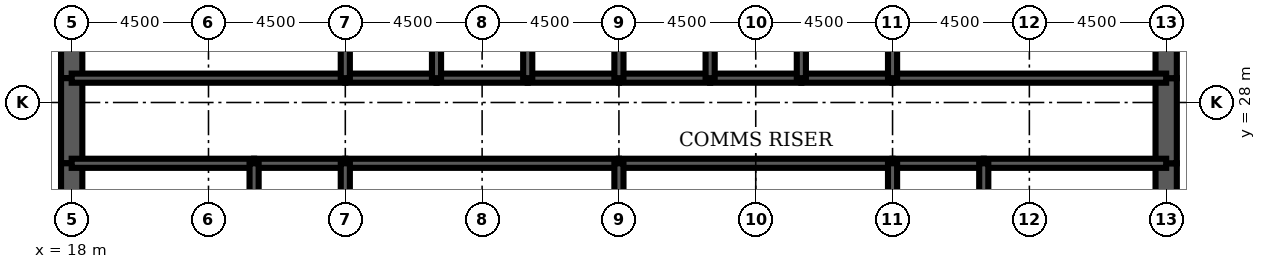
"""IFC4 building model, lengths in metres.
Left out: names, types, materials, properties, quantities, classifications, styles, units other than length and angle.
Written with IfcOpenShell. Run it as: python <this file> out.ifc"""

import sys

from ifc_helpers import new_model, si_unit, direction, frame, frame_2d, origin, place, context, subcontext, project, spatial, rectangle, extrude, element, fill, save


model = new_model("IFC4")
c1 = context("Model", 3, precision=1e-05, world=origin(), true_north=direction((0.0, 1.0)))
c2 = subcontext(c1, "Body", "Model", "MODEL_VIEW")
j1 = project(units=[si_unit("LENGTHUNIT", "METRE"), si_unit("PLANEANGLEUNIT", "RADIAN")], contexts=[c1])
p1 = place(None, origin())
s1 = spatial("IfcSite", under=j1, at=p1, CompositionType="ELEMENT")
p2 = place(p1, origin())
s2 = spatial("IfcBuilding", under=s1, at=p2, CompositionType="ELEMENT")
p3 = place(p2, frame((0.0, 0.0, 300.5)))
s3 = spatial("IfcBuildingStorey", under=s2, at=p3, CompositionType="ELEMENT", Elevation=300.5)
p4 = place(p3, frame((18.0, 32.0, 0.0), z_axis=(0.0, 0.0, 1.0), x_axis=(0.0, -1.0, 0.0)))
e1 = element("IfcWall", 1, at=p4, inside=s3, PredefinedType="SHEAR", context=c2, shape_type="SweptSolid", body=[
    extrude(rectangle(XDim=3.2, YDim=0.7, at=frame_2d((1.6, 0.0))), origin(), (0.0, 0.0, 1.0), 4.2),
])
p5 = place(p3, frame((18.0, 28.8, 0.0), z_axis=(0.0, 0.0, 1.0), x_axis=(0.0, -1.0, 0.0)))
e2 = element("IfcWall", 2, at=p5, inside=s3, PredefinedType="SHEAR", context=c2, shape_type="SweptSolid", body=[
    extrude(rectangle(XDim=2.8, YDim=0.7, at=frame_2d((1.4, 0.0))), origin(), (0.0, 0.0, 1.0), 4.2),
])
p6 = place(p5, frame((0.4, 0.0, 0.0)))
e3 = element("IfcOpeningElement", 3, at=p6, cuts=e2, PredefinedType="OPENING", context=c2, shape_type="SweptSolid", body=[
    extrude(rectangle(XDim=1.8, YDim=2.1, at=frame_2d((0.9, 1.05))), frame((0.0, 0.36, 0.0), z_axis=(0.0, -1.0, 0.0), x_axis=(1.0, 0.0, 0.0)), (0.0, 0.0, 1.0), 0.72),
])
for number, where, z_axis, x_axis in (
    (4, (18.0, 26.0, 0.0), (0.0, 0.0, 1.0), (0.0, -1.0, 0.0)),
    (5, (54.0, 22.0, 0.0), (0.0, 0.0, 1.0), (0.0, 1.0, 0.0)),
):
    element("IfcWall", number, at=place(p3, frame(where, z_axis=z_axis, x_axis=x_axis)), inside=s3, PredefinedType="SHEAR", context=c2, shape_type="SweptSolid", body=[
        extrude(rectangle(XDim=4.0, YDim=0.7, at=frame_2d((2.0, 0.0))), origin(), (0.0, 0.0, 1.0), 4.2),
    ])
p7 = place(p3, frame((54.0, 26.0, 0.0), z_axis=(0.0, 0.0, 1.0), x_axis=(0.0, 1.0, 0.0)))
e6 = element("IfcWall", 6, at=p7, inside=s3, PredefinedType="SHEAR", context=c2, shape_type="SweptSolid", body=[
    extrude(rectangle(XDim=2.8, YDim=0.7, at=frame_2d((1.4, 0.0))), origin(), (0.0, 0.0, 1.0), 4.2),
])
p8 = place(p7, frame((0.6, 0.0, 0.0)))
e7 = element("IfcOpeningElement", 7, at=p8, cuts=e6, PredefinedType="OPENING", context=c2, shape_type="SweptSolid", body=[
    extrude(rectangle(XDim=1.8, YDim=2.1, at=frame_2d((0.9, 1.05))), frame((0.0, 0.36, 0.0), z_axis=(0.0, -1.0, 0.0), x_axis=(1.0, 0.0, 0.0)), (0.0, 0.0, 1.0), 0.72),
])
p9 = place(p3, frame((54.0, 28.8, 0.0), z_axis=(0.0, 0.0, 1.0), x_axis=(0.0, 1.0, 0.0)))
e8 = element("IfcWall", 8, at=p9, inside=s3, PredefinedType="SHEAR", context=c2, shape_type="SweptSolid", body=[
    extrude(rectangle(XDim=3.2, YDim=0.7, at=frame_2d((1.6, 0.0))), origin(), (0.0, 0.0, 1.0), 4.2),
])
p10 = place(p3, frame((18.0, 28.8, 0.0), z_axis=(0.0, 0.0, 1.0), x_axis=(1.0, 0.0, 0.0)))
e9 = element("IfcWall", 9, at=p10, inside=s3, PredefinedType="SOLIDWALL", context=c2, shape_type="SweptSolid", body=[
    extrude(rectangle(XDim=9.0, YDim=0.3, at=frame_2d((4.5, 0.0))), origin(), (0.0, 0.0, 1.0), 4.2),
])
p11 = place(p10, frame((0.65, 0.0, 0.0)))
e10 = element("IfcOpeningElement", 10, at=p11, cuts=e9, PredefinedType="OPENING", context=c2, shape_type="SweptSolid", body=[
    extrude(rectangle(XDim=1.0, YDim=2.1, at=frame_2d((0.5, 1.05))), frame((0.0, 0.16, 0.0), z_axis=(0.0, -1.0, 0.0), x_axis=(1.0, 0.0, 0.0)), (0.0, 0.0, 1.0), 0.32),
])
p12 = place(p3, frame((27.0, 28.8, 0.0), z_axis=(0.0, 0.0, 1.0), x_axis=(1.0, 0.0, 0.0)))
e11 = element("IfcWall", 11, at=p12, inside=s3, PredefinedType="SOLIDWALL", context=c2, shape_type="SweptSolid", body=[
    extrude(rectangle(XDim=3.0, YDim=0.3, at=frame_2d((1.5, 0.0))), origin(), (0.0, 0.0, 1.0), 4.2),
])
p13 = place(p12, frame((0.95, 0.0, 0.0)))
e12 = element("IfcOpeningElement", 12, at=p13, cuts=e11, PredefinedType="OPENING", context=c2, shape_type="SweptSolid", body=[
    extrude(rectangle(XDim=1.1, YDim=2.2, at=frame_2d((0.55, 1.1))), frame((0.0, 0.16, 0.0), z_axis=(0.0, -1.0, 0.0), x_axis=(1.0, 0.0, 0.0)), (0.0, 0.0, 1.0), 0.32),
])
p14 = place(p3, frame((30.0, 28.8, 0.0), z_axis=(0.0, 0.0, 1.0), x_axis=(1.0, 0.0, 0.0)))
e13 = element("IfcWall", 13, at=p14, inside=s3, PredefinedType="SOLIDWALL", context=c2, shape_type="SweptSolid", body=[
    extrude(rectangle(XDim=3.0, YDim=0.3, at=frame_2d((1.5, 0.0))), origin(), (0.0, 0.0, 1.0), 4.2),
])
p15 = place(p14, frame((0.95, 0.0, 0.0)))
e14 = element("IfcOpeningElement", 14, at=p15, cuts=e13, PredefinedType="OPENING", context=c2, shape_type="SweptSolid", body=[
    extrude(rectangle(XDim=1.1, YDim=2.2, at=frame_2d((0.55, 1.1))), frame((0.0, 0.16, 0.0), z_axis=(0.0, -1.0, 0.0), x_axis=(1.0, 0.0, 0.0)), (0.0, 0.0, 1.0), 0.32),
])
p16 = place(p3, frame((33.0, 28.8, 0.0), z_axis=(0.0, 0.0, 1.0), x_axis=(1.0, 0.0, 0.0)))
e15 = element("IfcWall", 15, at=p16, inside=s3, PredefinedType="SOLIDWALL", context=c2, shape_type="SweptSolid", body=[
    extrude(rectangle(XDim=3.0, YDim=0.3, at=frame_2d((1.5, 0.0))), origin(), (0.0, 0.0, 1.0), 4.2),
])
p17 = place(p16, frame((0.95, 0.0, 0.0)))
e16 = element("IfcOpeningElement", 16, at=p17, cuts=e15, PredefinedType="OPENING", context=c2, shape_type="SweptSolid", body=[
    extrude(rectangle(XDim=1.1, YDim=2.2, at=frame_2d((0.55, 1.1))), frame((0.0, 0.16, 0.0), z_axis=(0.0, -1.0, 0.0), x_axis=(1.0, 0.0, 0.0)), (0.0, 0.0, 1.0), 0.32),
])
p18 = place(p3, frame((36.0, 28.8, 0.0), z_axis=(0.0, 0.0, 1.0), x_axis=(1.0, 0.0, 0.0)))
e17 = element("IfcWall", 17, at=p18, inside=s3, PredefinedType="SOLIDWALL", context=c2, shape_type="SweptSolid", body=[
    extrude(rectangle(XDim=3.0, YDim=0.3, at=frame_2d((1.5, 0.0))), origin(), (0.0, 0.0, 1.0), 4.2),
])
p19 = place(p18, frame((1.0, 0.0, 0.0)))
e18 = element("IfcOpeningElement", 18, at=p19, cuts=e17, PredefinedType="OPENING", context=c2, shape_type="SweptSolid", body=[
    extrude(rectangle(XDim=1.0, YDim=2.1, at=frame_2d((0.5, 1.05))), frame((0.0, 0.16, 0.0), z_axis=(0.0, -1.0, 0.0), x_axis=(1.0, 0.0, 0.0)), (0.0, 0.0, 1.0), 0.32),
])
p20 = place(p3, frame((39.0, 28.8, 0.0), z_axis=(0.0, 0.0, 1.0), x_axis=(1.0, 0.0, 0.0)))
e19 = element("IfcWall", 19, at=p20, inside=s3, PredefinedType="SOLIDWALL", context=c2, shape_type="SweptSolid", body=[
    extrude(rectangle(XDim=3.0, YDim=0.3, at=frame_2d((1.5, 0.0))), origin(), (0.0, 0.0, 1.0), 4.2),
])
p21 = place(p20, frame((1.0, 0.0, 0.0)))
e20 = element("IfcOpeningElement", 20, at=p21, cuts=e19, PredefinedType="OPENING", context=c2, shape_type="SweptSolid", body=[
    extrude(rectangle(XDim=1.0, YDim=2.1, at=frame_2d((0.5, 1.05))), frame((0.0, 0.16, 0.0), z_axis=(0.0, -1.0, 0.0), x_axis=(1.0, 0.0, 0.0)), (0.0, 0.0, 1.0), 0.32),
])
p22 = place(p3, frame((42.0, 28.8, 0.0), z_axis=(0.0, 0.0, 1.0), x_axis=(1.0, 0.0, 0.0)))
e21 = element("IfcWall", 21, at=p22, inside=s3, PredefinedType="SOLIDWALL", context=c2, shape_type="SweptSolid", body=[
    extrude(rectangle(XDim=3.0, YDim=0.3, at=frame_2d((1.5, 0.0))), origin(), (0.0, 0.0, 1.0), 4.2),
])
p23 = place(p22, frame((0.95, 0.0, 0.0)))
e22 = element("IfcOpeningElement", 22, at=p23, cuts=e21, PredefinedType="OPENING", context=c2, shape_type="SweptSolid", body=[
    extrude(rectangle(XDim=1.1, YDim=2.2, at=frame_2d((0.55, 1.1))), frame((0.0, 0.16, 0.0), z_axis=(0.0, -1.0, 0.0), x_axis=(1.0, 0.0, 0.0)), (0.0, 0.0, 1.0), 0.32),
])
p24 = place(p3, frame((45.0, 28.8, 0.0), z_axis=(0.0, 0.0, 1.0), x_axis=(1.0, 0.0, 0.0)))
e23 = element("IfcWall", 23, at=p24, inside=s3, PredefinedType="SOLIDWALL", context=c2, shape_type="SweptSolid", body=[
    extrude(rectangle(XDim=9.0, YDim=0.3, at=frame_2d((4.5, 0.0))), origin(), (0.0, 0.0, 1.0), 4.2),
])
p25 = place(p24, frame((7.35, 0.0, 0.0)))
e24 = element("IfcOpeningElement", 24, at=p25, cuts=e23, PredefinedType="OPENING", context=c2, shape_type="SweptSolid", body=[
    extrude(rectangle(XDim=1.0, YDim=2.1, at=frame_2d((0.5, 1.05))), frame((0.0, 0.16, 0.0), z_axis=(0.0, -1.0, 0.0), x_axis=(1.0, 0.0, 0.0)), (0.0, 0.0, 1.0), 0.32),
])
p26 = place(p3, frame((18.0, 26.0, 0.0), z_axis=(0.0, 0.0, 1.0), x_axis=(1.0, 0.0, 0.0)))
e25 = element("IfcWall", 25, at=p26, inside=s3, PredefinedType="SOLIDWALL", context=c2, shape_type="SweptSolid", body=[
    extrude(rectangle(XDim=6.0, YDim=0.3, at=frame_2d((3.0, 0.0))), origin(), (0.0, 0.0, 1.0), 4.2),
])
p27 = place(p3, frame((24.0, 26.0, 0.0), z_axis=(0.0, 0.0, 1.0), x_axis=(1.0, 0.0, 0.0)))
e26 = element("IfcWall", 26, at=p27, inside=s3, PredefinedType="SOLIDWALL", context=c2, shape_type="SweptSolid", body=[
    extrude(rectangle(XDim=3.0, YDim=0.3, at=frame_2d((1.5, 0.0))), origin(), (0.0, 0.0, 1.0), 4.2),
])
for number, where, z_axis, x_axis in (
    (27, (27.0, 26.0, 0.0), (0.0, 0.0, 1.0), (1.0, 0.0, 0.0)),
    (28, (36.0, 26.0, 0.0), (0.0, 0.0, 1.0), (1.0, 0.0, 0.0)),
):
    element("IfcWall", number, at=place(p3, frame(where, z_axis=z_axis, x_axis=x_axis)), inside=s3, PredefinedType="SOLIDWALL", context=c2, shape_type="SweptSolid", body=[
        extrude(rectangle(XDim=9.0, YDim=0.3, at=frame_2d((4.5, 0.0))), origin(), (0.0, 0.0, 1.0), 4.2),
    ])
p28 = place(p3, frame((45.0, 26.0, 0.0), z_axis=(0.0, 0.0, 1.0), x_axis=(1.0, 0.0, 0.0)))
e29 = element("IfcWall", 29, at=p28, inside=s3, PredefinedType="SOLIDWALL", context=c2, shape_type="SweptSolid", body=[
    extrude(rectangle(XDim=3.0, YDim=0.3, at=frame_2d((1.5, 0.0))), origin(), (0.0, 0.0, 1.0), 4.2),
])
p29 = place(p3, frame((48.0, 26.0, 0.0), z_axis=(0.0, 0.0, 1.0), x_axis=(1.0, 0.0, 0.0)))
e30 = element("IfcWall", 30, at=p29, inside=s3, PredefinedType="SOLIDWALL", context=c2, shape_type="SweptSolid", body=[
    extrude(rectangle(XDim=6.0, YDim=0.3, at=frame_2d((3.0, 0.0))), origin(), (0.0, 0.0, 1.0), 4.2),
])
for number, where, z_axis, x_axis in (
    (31, (27.0, 28.8, 0.0), (0.0, 0.0, 1.0), (0.0, 1.0, 0.0)),
    (32, (30.0, 28.8, 0.0), (0.0, 0.0, 1.0), (0.0, 1.0, 0.0)),
    (33, (33.0, 28.8, 0.0), (0.0, 0.0, 1.0), (0.0, 1.0, 0.0)),
    (34, (36.0, 28.8, 0.0), (0.0, 0.0, 1.0), (0.0, 1.0, 0.0)),
    (35, (39.0, 28.8, 0.0), (0.0, 0.0, 1.0), (0.0, 1.0, 0.0)),
    (36, (42.0, 28.8, 0.0), (0.0, 0.0, 1.0), (0.0, 1.0, 0.0)),
    (37, (45.0, 28.8, 0.0), (0.0, 0.0, 1.0), (0.0, 1.0, 0.0)),
):
    element("IfcWall", number, at=place(p3, frame(where, z_axis=z_axis, x_axis=x_axis)), inside=s3, PredefinedType="SOLIDWALL", context=c2, shape_type="SweptSolid", body=[
        extrude(rectangle(XDim=3.2, YDim=0.3, at=frame_2d((1.6, 0.0))), origin(), (0.0, 0.0, 1.0), 4.2),
    ])
for number, where, z_axis, x_axis in (
    (38, (24.0, 22.0, 0.0), (0.0, 0.0, 1.0), (0.0, 1.0, 0.0)),
    (39, (27.0, 22.0, 0.0), (0.0, 0.0, 1.0), (0.0, 1.0, 0.0)),
    (40, (36.0, 22.0, 0.0), (0.0, 0.0, 1.0), (0.0, 1.0, 0.0)),
    (41, (45.0, 22.0, 0.0), (0.0, 0.0, 1.0), (0.0, 1.0, 0.0)),
    (42, (48.0, 22.0, 0.0), (0.0, 0.0, 1.0), (0.0, 1.0, 0.0)),
):
    element("IfcWall", number, at=place(p3, frame(where, z_axis=z_axis, x_axis=x_axis)), inside=s3, PredefinedType="SOLIDWALL", context=c2, shape_type="SweptSolid", body=[
        extrude(rectangle(XDim=4.0, YDim=0.3, at=frame_2d((2.0, 0.0))), origin(), (0.0, 0.0, 1.0), 4.2),
    ])
p30 = place(p3, frame((42.0, 22.15, 0.0), z_axis=(0.0, 0.0, 1.0), x_axis=(0.0, 1.0, 0.0)))
e43 = element("IfcWall", 43, at=p30, inside=s3, PredefinedType="PARTITIONING", context=c2, shape_type="SweptSolid", body=[
    extrude(rectangle(XDim=3.7, YDim=0.15, at=frame_2d((1.85, 0.0))), origin(), (0.0, 0.0, 1.0), 3.0),
])
p31 = place(p30, frame((2.2, 0.0, 0.0)))
e44 = element("IfcOpeningElement", 44, at=p31, cuts=e43, PredefinedType="OPENING", context=c2, shape_type="SweptSolid", body=[
    extrude(rectangle(XDim=1.0, YDim=2.1, at=frame_2d((0.5, 1.05))), frame((0.0, 0.085, 0.0), z_axis=(0.0, -1.0, 0.0), x_axis=(1.0, 0.0, 0.0)), (0.0, 0.0, 1.0), 0.17),
])
for number, where, z_axis, x_axis in (
    (45, (20.225, 22.15, 0.0), (0.0, 0.0, 1.0), (0.0, 1.0, 0.0)),
    (46, (51.475, 22.15, 0.0), (0.0, 0.0, 1.0), (0.0, 1.0, 0.0)),
):
    element("IfcWall", number, at=place(p3, frame(where, z_axis=z_axis, x_axis=x_axis)), inside=s3, PredefinedType="PARTITIONING", context=c2, shape_type="SweptSolid", body=[
        extrude(rectangle(XDim=3.7, YDim=0.15, at=frame_2d((1.85, 0.0))), origin(), (0.0, 0.0, 1.0), 3.0),
    ])
p32 = place(p31, origin())
e47 = element("IfcDoor", 47, at=p32, inside=s3, OperationType="SINGLE_SWING_RIGHT", PredefinedType="DOOR", context=c2, shape_type="SweptSolid", body=[
    extrude(rectangle(XDim=1.0, YDim=2.1, at=frame_2d((0.5, 1.05))), frame((0.0, 0.025, 0.0), z_axis=(0.0, -1.0, 0.0), x_axis=(1.0, 0.0, 0.0)), (0.0, 0.0, 1.0), 0.05),
])
fill(e44, e47)
p33 = place(p23, origin())
e48 = element("IfcDoor", 48, at=p33, inside=s3, OperationType="DOUBLE_DOOR_SLIDING", PredefinedType="USERDEFINED", context=c2, shape_type="SweptSolid", body=[
    extrude(rectangle(XDim=1.1, YDim=2.2, at=frame_2d((0.55, 1.1))), frame((0.0, 0.025, 0.0), z_axis=(0.0, -1.0, 0.0), x_axis=(1.0, 0.0, 0.0)), (0.0, 0.0, 1.0), 0.05),
])
fill(e22, e48)
p34 = place(p13, origin())
e49 = element("IfcDoor", 49, at=p34, inside=s3, OperationType="DOUBLE_DOOR_SLIDING", PredefinedType="USERDEFINED", context=c2, shape_type="SweptSolid", body=[
    extrude(rectangle(XDim=1.1, YDim=2.2, at=frame_2d((0.55, 1.1))), frame((0.0, 0.025, 0.0), z_axis=(0.0, -1.0, 0.0), x_axis=(1.0, 0.0, 0.0)), (0.0, 0.0, 1.0), 0.05),
])
fill(e12, e49)
p35 = place(p15, origin())
e50 = element("IfcDoor", 50, at=p35, inside=s3, OperationType="DOUBLE_DOOR_SLIDING", PredefinedType="USERDEFINED", context=c2, shape_type="SweptSolid", body=[
    extrude(rectangle(XDim=1.1, YDim=2.2, at=frame_2d((0.55, 1.1))), frame((0.0, 0.025, 0.0), z_axis=(0.0, -1.0, 0.0), x_axis=(1.0, 0.0, 0.0)), (0.0, 0.0, 1.0), 0.05),
])
fill(e14, e50)
p36 = place(p17, origin())
e51 = element("IfcDoor", 51, at=p36, inside=s3, OperationType="DOUBLE_DOOR_SLIDING", PredefinedType="USERDEFINED", context=c2, shape_type="SweptSolid", body=[
    extrude(rectangle(XDim=1.1, YDim=2.2, at=frame_2d((0.55, 1.1))), frame((0.0, 0.025, 0.0), z_axis=(0.0, -1.0, 0.0), x_axis=(1.0, 0.0, 0.0)), (0.0, 0.0, 1.0), 0.05),
])
fill(e16, e51)
p37 = place(p11, origin())
e52 = element("IfcDoor", 52, at=p37, inside=s3, OperationType="SINGLE_SWING_LEFT", PredefinedType="DOOR", context=c2, shape_type="SweptSolid", body=[
    extrude(rectangle(XDim=1.0, YDim=2.1, at=frame_2d((0.5, 1.05))), frame((0.0, 0.025, 0.0), z_axis=(0.0, -1.0, 0.0), x_axis=(1.0, 0.0, 0.0)), (0.0, 0.0, 1.0), 0.05),
])
fill(e10, e52)
p38 = place(p25, origin())
e53 = element("IfcDoor", 53, at=p38, inside=s3, OperationType="SINGLE_SWING_RIGHT", PredefinedType="DOOR", context=c2, shape_type="SweptSolid", body=[
    extrude(rectangle(XDim=1.0, YDim=2.1, at=frame_2d((0.5, 1.05))), frame((0.0, 0.025, 0.0), z_axis=(0.0, -1.0, 0.0), x_axis=(1.0, 0.0, 0.0)), (0.0, 0.0, 1.0), 0.05),
])
fill(e24, e53)
p39 = place(p6, origin())
e54 = element("IfcDoor", 54, at=p39, inside=s3, OperationType="SINGLE_SWING_LEFT", PredefinedType="DOOR", context=c2, shape_type="SweptSolid", body=[
    extrude(rectangle(XDim=1.8, YDim=2.1, at=frame_2d((0.9, 1.05))), frame((0.0, 0.35, 0.0), z_axis=(0.0, -1.0, 0.0), x_axis=(1.0, 0.0, 0.0)), (0.0, 0.0, 1.0), 0.699),
])
fill(e3, e54)
p40 = place(p8, origin())
e55 = element("IfcDoor", 55, at=p40, inside=s3, OperationType="SINGLE_SWING_LEFT", PredefinedType="DOOR", context=c2, shape_type="SweptSolid", body=[
    extrude(rectangle(XDim=1.8, YDim=2.1, at=frame_2d((0.9, 1.05))), frame((0.0, 0.35, 0.0), z_axis=(0.0, -1.0, 0.0), x_axis=(1.0, 0.0, 0.0)), (0.0, 0.0, 1.0), 0.699),
])
fill(e7, e55)
p41 = place(p19, origin())
e56 = element("IfcDoor", 56, at=p41, inside=s3, OperationType="SINGLE_SWING_LEFT", PredefinedType="DOOR", context=c2, shape_type="SweptSolid", body=[
    extrude(rectangle(XDim=1.0, YDim=2.1, at=frame_2d((0.5, 1.05))), frame((0.0, 0.025, 0.0), z_axis=(0.0, -1.0, 0.0), x_axis=(1.0, 0.0, 0.0)), (0.0, 0.0, 1.0), 0.05),
])
fill(e18, e56)
p42 = place(p21, origin())
e57 = element("IfcDoor", 57, at=p42, inside=s3, OperationType="SINGLE_SWING_LEFT", PredefinedType="DOOR", context=c2, shape_type="SweptSolid", body=[
    extrude(rectangle(XDim=1.0, YDim=2.1, at=frame_2d((0.5, 1.05))), frame((0.0, 0.025, 0.0), z_axis=(0.0, -1.0, 0.0), x_axis=(1.0, 0.0, 0.0)), (0.0, 0.0, 1.0), 0.05),
])
fill(e20, e57)
save(model, sys.argv[1])
